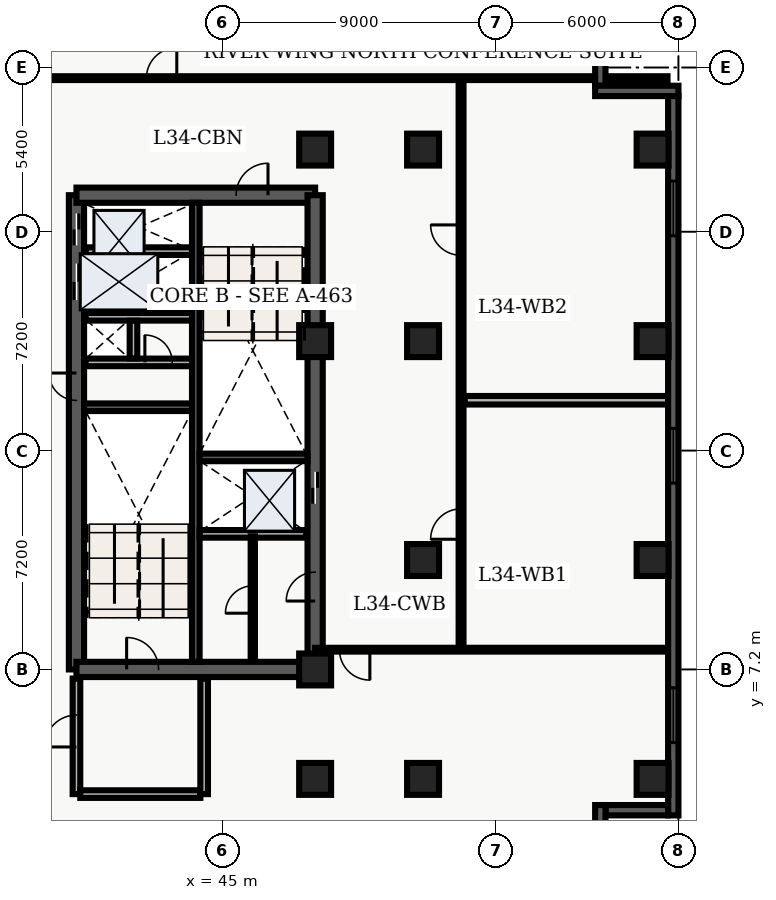
"""IFC4 building model, lengths in metres.
Left out: names, types, materials, properties, quantities, classifications, styles, units other than length and angle.
Written with IfcOpenShell. Run it as: python <this file> out.ifc"""

import sys

from ifc_helpers import new_model, entity, si_unit, converted_unit, direction, frame, origin_with_axes, origin_2d_with_axis, place, context, subcontext, project, spatial, polyline, rectangle, outline, extrude, element, fill, save


model = new_model("IFC4")
c1 = context("Model", 3, precision=1e-05, world=origin_with_axes(), true_north=direction((0.0, 1.0)))
c2 = subcontext(c1, "Body", "Model", "MODEL_VIEW")
j1 = project(units=[si_unit("LENGTHUNIT", "METRE"), converted_unit("PLANEANGLEUNIT", "DEGREE", entity("IfcPlaneAngleMeasure", 0.017), si_unit("PLANEANGLEUNIT", "RADIAN"), dimensions=[0, 0, 0, 0, 0, 0, 0])], contexts=[c1])
p1 = place(None, origin_with_axes())
s1 = spatial("IfcSite", under=j1, at=p1, CompositionType="ELEMENT")
p2 = place(p1, origin_with_axes())
s2 = spatial("IfcBuilding", under=s1, at=p2, CompositionType="ELEMENT")
p3 = place(p2, frame((0.0, 0.0, 140.7), z_axis=(0.0, 0.0, 1.0), x_axis=(1.0, 0.0, 0.0)))
s3 = spatial("IfcBuildingStorey", under=s2, at=p3, CompositionType="ELEMENT", Elevation=140.7)
p4 = place(p3, frame((40.2, 7.2, 0.0), z_axis=(0.0, 0.0, 1.0), x_axis=(0.0, 1.0, 0.0)))
e1 = element("IfcWall", 1, at=p4, inside=s3, PredefinedType="SHEAR", context=c2, shape_type="SweptSolid", body=[
    extrude(outline(polyline([(0.0, -0.25), (15.6, -0.25), (15.6, 0.25), (0.0, 0.25), (0.0, -0.25)])), origin_with_axes(), (0.0, 0.0, 1.0), 3.66),
])
p5 = place(p4, frame((14.475, 0.0, 0.0), z_axis=(0.0, 0.0, 1.0), x_axis=(1.0, 0.0, 0.0)))
e2 = element("IfcOpeningElement", 2, at=p5, cuts=e1, PredefinedType="OPENING", context=c2, shape_type="SweptSolid", body=[
    extrude(rectangle(XDim=1.05, YDim=0.52, at=origin_2d_with_axis()), origin_with_axes(), (0.0, 0.0, 1.0), 2.15),
])
p6 = place(p4, frame((12.75, 0.0, 0.0), z_axis=(0.0, 0.0, 1.0), x_axis=(1.0, 0.0, 0.0)))
e3 = element("IfcOpeningElement", 3, at=p6, cuts=e1, PredefinedType="OPENING", context=c2, shape_type="SweptSolid", body=[
    extrude(rectangle(XDim=1.2, YDim=0.52, at=origin_2d_with_axis()), origin_with_axes(), (0.0, 0.0, 1.0), 2.15),
])
p7 = place(p4, frame((9.3, 0.0, 0.0), z_axis=(0.0, 0.0, 1.0), x_axis=(1.0, 0.0, 0.0)))
e4 = element("IfcOpeningElement", 4, at=p7, cuts=e1, PredefinedType="OPENING", context=c2, shape_type="SweptSolid", body=[
    extrude(rectangle(XDim=0.9, YDim=0.52, at=origin_2d_with_axis()), origin_with_axes(), (0.0, 0.0, 1.0), 2.15),
])
p8 = place(p3, frame((40.2, 7.2, 0.0), z_axis=(0.0, 0.0, 1.0), x_axis=(1.0, 0.0, 0.0)))
e5 = element("IfcWall", 5, at=p8, inside=s3, PredefinedType="SHEAR", context=c2, shape_type="SweptSolid", body=[
    extrude(outline(polyline([(0.0, -0.25), (7.85, -0.25), (7.85, 0.25), (0.0, 0.25), (0.0, -0.25)])), origin_with_axes(), (0.0, 0.0, 1.0), 3.66),
])
p9 = place(p8, frame((2.175, 0.0, 0.0), z_axis=(0.0, 0.0, 1.0), x_axis=(1.0, 0.0, 0.0)))
e6 = element("IfcOpeningElement", 6, at=p9, cuts=e5, PredefinedType="OPENING", context=c2, shape_type="SweptSolid", body=[
    extrude(rectangle(XDim=1.05, YDim=0.52, at=origin_2d_with_axis()), origin_with_axes(), (0.0, 0.0, 1.0), 2.15),
])
p10 = place(p3, frame((40.2, 22.8, 0.0), z_axis=(0.0, 0.0, 1.0), x_axis=(1.0, 0.0, 0.0)))
e7 = element("IfcWall", 7, at=p10, inside=s3, PredefinedType="SHEAR", context=c2, shape_type="SweptSolid", body=[
    extrude(outline(polyline([(0.0, -0.25), (7.85, -0.25), (7.85, 0.25), (0.0, 0.25), (0.0, -0.25)])), origin_with_axes(), (0.0, 0.0, 1.0), 3.66),
])
p11 = place(p10, frame((5.775, 0.0, 0.0), z_axis=(0.0, 0.0, 1.0), x_axis=(1.0, 0.0, 0.0)))
e8 = element("IfcOpeningElement", 8, at=p11, cuts=e7, PredefinedType="OPENING", context=c2, shape_type="SweptSolid", body=[
    extrude(rectangle(XDim=1.05, YDim=0.52, at=origin_2d_with_axis()), origin_with_axes(), (0.0, 0.0, 1.0), 2.15),
])
p12 = place(p3, frame((48.05, 7.2, 0.0), z_axis=(0.0, 0.0, 1.0), x_axis=(0.0, 1.0, 0.0)))
e9 = element("IfcWall", 9, at=p12, inside=s3, PredefinedType="SHEAR", context=c2, shape_type="SweptSolid", body=[
    extrude(outline(polyline([(0.0, -0.25), (15.6, -0.25), (15.6, 0.25), (0.0, 0.25), (0.0, -0.25)])), origin_with_axes(), (0.0, 0.0, 1.0), 3.66),
])
p13 = place(p12, frame((5.975, 0.0, 0.0), z_axis=(0.0, 0.0, 1.0), x_axis=(1.0, 0.0, 0.0)))
e10 = element("IfcOpeningElement", 10, at=p13, cuts=e9, PredefinedType="OPENING", context=c2, shape_type="SweptSolid", body=[
    extrude(rectangle(XDim=1.05, YDim=0.52, at=origin_2d_with_axis()), origin_with_axes(), (0.0, 0.0, 1.0), 2.15),
])
p14 = place(p12, frame((2.725, 0.0, 0.0), z_axis=(0.0, 0.0, 1.0), x_axis=(1.0, 0.0, 0.0)))
e11 = element("IfcOpeningElement", 11, at=p14, cuts=e9, PredefinedType="OPENING", context=c2, shape_type="SweptSolid", body=[
    extrude(rectangle(XDim=0.95, YDim=0.52, at=origin_2d_with_axis()), origin_with_axes(), (0.0, 0.0, 1.0), 2.15),
])
p15 = place(p3, frame((44.125, 7.45, 0.0), z_axis=(0.0, 0.0, 1.0), x_axis=(0.0, 1.0, 0.0)))
e12 = element("IfcWall", 12, at=p15, inside=s3, PredefinedType="SHEAR", context=c2, shape_type="SweptSolid", body=[
    extrude(outline(polyline([(0.0, -0.125), (15.1, -0.125), (15.1, 0.125), (0.0, 0.125), (0.0, -0.125)])), origin_with_axes(), (0.0, 0.0, 1.0), 3.66),
])
for number, where, z_axis, x_axis in (
    (13, (40.45, 15.825, 0.0), (0.0, 0.0, 1.0), (1.0, 0.0, 0.0)),
    (14, (44.25, 14.175, 0.0), (0.0, 0.0, 1.0), (1.0, 0.0, 0.0)),
):
    element("IfcWall", number, at=place(p3, frame(where, z_axis=z_axis, x_axis=x_axis)), inside=s3, PredefinedType="SHEAR", context=c2, shape_type="SweptSolid", body=[
        extrude(outline(polyline([(0.0, -0.125), (3.55, -0.125), (3.55, 0.125), (0.0, 0.125), (0.0, -0.125)])), origin_with_axes(), (0.0, 0.0, 1.0), 3.66),
    ])
p16 = place(p3, frame((40.5, 17.3, 0.0), z_axis=(0.0, 0.0, 1.0), x_axis=(1.0, 0.0, 0.0)))
e15 = element("IfcWall", 15, at=p16, inside=s3, PredefinedType="SOLIDWALL", context=c2, shape_type="SweptSolid", body=[
    extrude(outline(polyline([(0.0, -0.125), (3.5, -0.125), (3.5, 0.125), (0.0, 0.125), (0.0, -0.125)])), origin_with_axes(), (0.0, 0.0, 1.0), 2.7),
])
p17 = place(p16, frame((2.4, 0.0, 0.0), z_axis=(0.0, 0.0, 1.0), x_axis=(1.0, 0.0, 0.0)))
e16 = element("IfcOpeningElement", 16, at=p17, cuts=e15, PredefinedType="OPENING", context=c2, shape_type="SweptSolid", body=[
    extrude(rectangle(XDim=0.9, YDim=0.27, at=origin_2d_with_axis()), origin_with_axes(), (0.0, 0.0, 1.0), 2.15),
])
p18 = place(p3, frame((40.5, 18.8, 0.0), z_axis=(0.0, 0.0, 1.0), x_axis=(1.0, 0.0, 0.0)))
e17 = element("IfcWall", 17, at=p18, inside=s3, PredefinedType="SOLIDWALL", context=c2, shape_type="SweptSolid", body=[
    extrude(outline(polyline([(0.0, -0.125), (3.5, -0.125), (3.5, 0.125), (0.0, 0.125), (0.0, -0.125)])), origin_with_axes(), (0.0, 0.0, 1.0), 2.7),
])
p19 = place(p3, frame((42.075, 17.43, 0.0), z_axis=(0.0, 0.0, 1.0), x_axis=(0.0, 1.0, 0.0)))
e18 = element("IfcWall", 18, at=p19, inside=s3, PredefinedType="SOLIDWALL", context=c2, shape_type="SweptSolid", body=[
    extrude(outline(polyline([(0.0, -0.125), (1.24, -0.125), (1.24, 0.125), (0.0, 0.125), (0.0, -0.125)])), origin_with_axes(), (0.0, 0.0, 1.0), 2.7),
])
p20 = place(p3, frame((40.2, 3.1, 0.0), z_axis=(0.0, 0.0, 1.0), x_axis=(0.0, 1.0, 0.0)))
e19 = element("IfcWall", 19, at=p20, inside=s3, PredefinedType="SOLIDWALL", context=c2, shape_type="SweptSolid", body=[
    extrude(outline(polyline([(0.0, -0.125), (3.8, -0.125), (3.8, 0.125), (0.0, 0.125), (0.0, -0.125)])), origin_with_axes(), (0.0, 0.0, 1.0), 2.7),
])
p21 = place(p20, frame((2.075, 0.0, 0.0), z_axis=(0.0, 0.0, 1.0), x_axis=(1.0, 0.0, 0.0)))
e20 = element("IfcOpeningElement", 20, at=p21, cuts=e19, PredefinedType="OPENING", context=c2, shape_type="SweptSolid", body=[
    extrude(rectangle(XDim=1.05, YDim=0.27, at=origin_2d_with_axis()), origin_with_axes(), (0.0, 0.0, 1.0), 2.15),
])
p22 = place(p3, frame((40.325, 3.1, 0.0), z_axis=(0.0, 0.0, 1.0), x_axis=(1.0, 0.0, 0.0)))
e21 = element("IfcWall", 21, at=p22, inside=s3, PredefinedType="SOLIDWALL", context=c2, shape_type="SweptSolid", body=[
    extrude(outline(polyline([(0.0, -0.125), (3.95, -0.125), (3.95, 0.125), (0.0, 0.125), (0.0, -0.125)])), origin_with_axes(), (0.0, 0.0, 1.0), 2.7),
])
p23 = place(p3, frame((44.4, 3.1, 0.0), z_axis=(0.0, 0.0, 1.0), x_axis=(0.0, 1.0, 0.0)))
e22 = element("IfcWall", 22, at=p23, inside=s3, PredefinedType="SOLIDWALL", context=c2, shape_type="SweptSolid", body=[
    extrude(outline(polyline([(0.0, -0.125), (3.8, -0.125), (3.8, 0.125), (0.0, 0.125), (0.0, -0.125)])), origin_with_axes(), (0.0, 0.0, 1.0), 2.7),
])
for number, where, z_axis, x_axis in (
    (23, (48.05, 3.6, 0.0), (0.0, 0.0, 1.0), (1.0, 0.0, 0.0)),
    (24, (48.05, 7.2, 0.0), (0.0, 0.0, 1.0), (1.0, 0.0, 0.0)),
    (25, (48.05, 18.0, 0.0), (0.0, 0.0, 1.0), (1.0, 0.0, 0.0)),
    (26, (48.05, 24.3, 0.0), (0.0, 0.0, 1.0), (1.0, 0.0, 0.0)),
    (27, (51.6, 3.6, 0.0), (0.0, 0.0, 1.0), (1.0, 0.0, 0.0)),
    (28, (51.6, 10.8, 0.0), (0.0, 0.0, 1.0), (1.0, 0.0, 0.0)),
    (29, (51.6, 18.0, 0.0), (0.0, 0.0, 1.0), (1.0, 0.0, 0.0)),
    (30, (51.6, 24.3, 0.0), (0.0, 0.0, 1.0), (1.0, 0.0, 0.0)),
    (31, (59.15, 3.6, 0.0), (0.0, 0.0, 1.0), (1.0, 0.0, 0.0)),
    (32, (59.15, 10.8, 0.0), (0.0, 0.0, 1.0), (1.0, 0.0, 0.0)),
    (33, (59.15, 18.0, 0.0), (0.0, 0.0, 1.0), (1.0, 0.0, 0.0)),
    (34, (59.15, 24.3, 0.0), (0.0, 0.0, 1.0), (1.0, 0.0, 0.0)),
):
    element("IfcColumn", number, at=place(p3, frame(where, z_axis=z_axis, x_axis=x_axis)), inside=s3, PredefinedType="COLUMN", context=c2, shape_type="SweptSolid", body=[
        extrude(rectangle(XDim=1.05, YDim=1.05, at=origin_2d_with_axis()), origin_with_axes(), (0.0, 0.0, 1.0), 3.9),
    ])
for number, where, z_axis, x_axis in (
    (35, (40.5, 20.96, 0.0), (0.0, 0.0, 1.0), (1.0, 0.0, 0.0)),
    (36, (44.25, 11.66, 0.0), (0.0, 0.0, 1.0), (1.0, 0.0, 0.0)),
):
    element("IfcWall", number, at=place(p3, frame(where, z_axis=z_axis, x_axis=x_axis)), inside=s3, PredefinedType="SOLIDWALL", context=c2, shape_type="SweptSolid", body=[
        extrude(outline(polyline([(0.0, -0.125), (3.5, -0.125), (3.5, 0.125), (0.0, 0.125), (0.0, -0.125)])), origin_with_axes(), (0.0, 0.0, 1.0), 2.7),
    ])
p24 = place(p3, frame((46.0, 7.5, 0.0), z_axis=(0.0, 0.0, 1.0), x_axis=(0.0, 1.0, 0.0)))
e37 = element("IfcWall", 37, at=p24, inside=s3, PredefinedType="PARTITIONING", context=c2, shape_type="SweptSolid", body=[
    extrude(outline(polyline([(0.0, -0.07), (4.08, -0.07), (4.08, 0.07), (0.0, 0.07), (0.0, -0.07)])), origin_with_axes(), (0.0, 0.0, 1.0), 2.7),
])
p25 = place(p24, frame((2.0, 0.0, 0.0), z_axis=(0.0, 0.0, 1.0), x_axis=(1.0, 0.0, 0.0)))
e38 = element("IfcOpeningElement", 38, at=p25, cuts=e37, PredefinedType="OPENING", context=c2, shape_type="SweptSolid", body=[
    extrude(rectangle(XDim=0.9, YDim=0.16, at=origin_2d_with_axis()), origin_with_axes(), (0.0, 0.0, 1.0), 2.15),
])
p26 = place(p3, frame((52.85, 7.85, 0.0), z_axis=(0.0, 0.0, 1.0), x_axis=(0.0, 1.0, 0.0)))
e39 = element("IfcWall", 39, at=p26, inside=s3, PredefinedType="PARTITIONING", context=c2, shape_type="SweptSolid", body=[
    extrude(outline(polyline([(0.0, -0.08), (18.8, -0.08), (18.8, 0.08), (0.0, 0.08), (0.0, -0.08)])), origin_with_axes(), (0.0, 0.0, 1.0), 2.7),
])
p27 = place(p26, frame((4.133, 0.0, 0.0), z_axis=(0.0, 0.0, 1.0), x_axis=(1.0, 0.0, 0.0)))
e40 = element("IfcOpeningElement", 40, at=p27, cuts=e39, PredefinedType="OPENING", context=c2, shape_type="SweptSolid", body=[
    extrude(rectangle(XDim=1.0, YDim=0.18, at=origin_2d_with_axis()), origin_with_axes(), (0.0, 0.0, 1.0), 2.15),
])
p28 = place(p26, frame((13.473, 0.0, 0.0), z_axis=(0.0, 0.0, 1.0), x_axis=(1.0, 0.0, 0.0)))
e41 = element("IfcOpeningElement", 41, at=p28, cuts=e39, PredefinedType="OPENING", context=c2, shape_type="SweptSolid", body=[
    extrude(rectangle(XDim=1.0, YDim=0.18, at=origin_2d_with_axis()), origin_with_axes(), (0.0, 0.0, 1.0), 2.15),
])
p29 = place(p3, frame((59.665, 7.85, 0.0), z_axis=(0.0, 0.0, 1.0), x_axis=(-1.0, 0.0, 0.0)))
e42 = element("IfcWall", 42, at=p29, inside=s3, PredefinedType="PARTITIONING", context=c2, shape_type="SweptSolid", body=[
    extrude(outline(polyline([(0.0, -0.062), (11.615, -0.062), (11.615, 0.062), (0.0, 0.062), (0.0, -0.062)])), origin_with_axes(), (0.0, 0.0, 1.0), 2.7),
])
p30 = place(p29, frame((10.315, 0.0, 0.0), z_axis=(0.0, 0.0, 1.0), x_axis=(1.0, 0.0, 0.0)))
e43 = element("IfcOpeningElement", 43, at=p30, cuts=e42, PredefinedType="OPENING", context=c2, shape_type="SweptSolid", body=[
    extrude(rectangle(XDim=1.0, YDim=0.145, at=origin_2d_with_axis()), origin_with_axes(), (0.0, 0.0, 1.0), 2.15),
])
p31 = place(p3, frame((38.735, 26.65, 0.0), z_axis=(0.0, 0.0, 1.0), x_axis=(1.0, 0.0, 0.0)))
e44 = element("IfcWall", 44, at=p31, inside=s3, PredefinedType="PARTITIONING", context=c2, shape_type="SweptSolid", body=[
    extrude(outline(polyline([(0.0, -0.062), (20.905, -0.062), (20.905, 0.062), (0.0, 0.062), (0.0, -0.062)])), origin_with_axes(), (0.0, 0.0, 1.0), 2.7),
])
p32 = place(p31, frame((4.265, 0.0, 0.0), z_axis=(0.0, 0.0, 1.0), x_axis=(1.0, 0.0, 0.0)))
e45 = element("IfcOpeningElement", 45, at=p32, cuts=e44, PredefinedType="OPENING", context=c2, shape_type="SweptSolid", body=[
    extrude(rectangle(XDim=1.0, YDim=0.145, at=origin_2d_with_axis()), origin_with_axes(), (0.0, 0.0, 1.0), 2.15),
])
p33 = place(p3, frame((52.97, 16.055, 0.0), z_axis=(0.0, 0.0, 1.0), x_axis=(1.0, 0.0, 0.0)))
e46 = element("IfcWall", 46, at=p33, inside=s3, PredefinedType="PARTITIONING", context=c2, shape_type="SweptSolid", body=[
    extrude(outline(polyline([(0.0, -0.14), (6.695, -0.14), (6.695, 0.14), (0.0, 0.14), (0.0, -0.14)])), origin_with_axes(), (0.0, 0.0, 1.0), 2.7),
])
p34 = place(p3, frame((57.43, 28.46, 0.0), z_axis=(0.0, 0.0, 1.0), x_axis=(0.0, -1.0, 0.0)))
e47 = element("IfcWall", 47, at=p34, inside=s3, PredefinedType="SOLIDWALL", context=c2, shape_type="SweptSolid", body=[
    extrude(outline(polyline([(0.0, -0.17), (2.06, -0.17), (2.06, 0.17), (0.0, 0.17), (0.0, -0.17)])), origin_with_axes(), (0.0, 0.0, 1.0), 3.66),
])
p35 = place(p3, frame((57.26, 26.23, 0.0), z_axis=(0.0, 0.0, 1.0), x_axis=(1.0, 0.0, 0.0)))
e48 = element("IfcWall", 48, at=p35, inside=s3, PredefinedType="SOLIDWALL", context=c2, shape_type="SweptSolid", body=[
    extrude(outline(polyline([(0.0, -0.17), (2.74, -0.17), (2.74, 0.17), (0.0, 0.17), (0.0, -0.17)])), origin_with_axes(), (0.0, 0.0, 1.0), 3.66),
])
p36 = place(p3, frame((59.83, 26.06, 0.0), z_axis=(0.0, 0.0, 1.0), x_axis=(0.0, -1.0, 0.0)))
e49 = element("IfcWall", 49, at=p36, inside=s3, PredefinedType="SOLIDWALL", context=c2, shape_type="SweptSolid", body=[
    extrude(outline(polyline([(0.0, -0.17), (23.66, -0.17), (23.66, 0.17), (0.0, 0.17), (0.0, -0.17)])), origin_with_axes(), (0.0, 0.0, 1.0), 3.66),
])
p37 = place(p36, frame((3.696, 0.0, 0.45), z_axis=(0.0, 0.0, 1.0), x_axis=(1.0, 0.0, 0.0)))
e50 = element("IfcOpeningElement", 50, at=p37, cuts=e49, PredefinedType="OPENING", context=c2, shape_type="SweptSolid", body=[
    extrude(rectangle(XDim=1.8, YDim=0.36, at=origin_2d_with_axis()), origin_with_axes(), (0.0, 0.0, 1.0), 2.1),
])
p38 = place(p36, frame((11.83, 0.0, 0.45), z_axis=(0.0, 0.0, 1.0), x_axis=(1.0, 0.0, 0.0)))
e51 = element("IfcOpeningElement", 51, at=p38, cuts=e49, PredefinedType="OPENING", context=c2, shape_type="SweptSolid", body=[
    extrude(rectangle(XDim=1.8, YDim=0.36, at=origin_2d_with_axis()), origin_with_axes(), (0.0, 0.0, 1.0), 2.1),
])
p39 = place(p36, frame((20.364, 0.0, 0.45), z_axis=(0.0, 0.0, 1.0), x_axis=(1.0, 0.0, 0.0)))
e52 = element("IfcOpeningElement", 52, at=p39, cuts=e49, PredefinedType="OPENING", context=c2, shape_type="SweptSolid", body=[
    extrude(rectangle(XDim=1.8, YDim=0.36, at=origin_2d_with_axis()), origin_with_axes(), (0.0, 0.0, 1.0), 2.1),
])
p40 = place(p3, frame((59.66, 2.57, 0.0), z_axis=(0.0, 0.0, 1.0), x_axis=(-1.0, 0.0, 0.0)))
e53 = element("IfcWall", 53, at=p40, inside=s3, PredefinedType="SOLIDWALL", context=c2, shape_type="SweptSolid", body=[
    extrude(outline(polyline([(0.0, -0.17), (2.06, -0.17), (2.06, 0.17), (0.0, 0.17), (0.0, -0.17)])), origin_with_axes(), (0.0, 0.0, 1.0), 3.66),
])
p41 = place(p3, frame((57.43, 2.74, 0.0), z_axis=(0.0, 0.0, 1.0), x_axis=(0.0, -1.0, 0.0)))
e54 = element("IfcWall", 54, at=p41, inside=s3, PredefinedType="SOLIDWALL", context=c2, shape_type="SweptSolid", body=[
    extrude(outline(polyline([(0.0, -0.17), (2.74, -0.17), (2.74, 0.17), (0.0, 0.17), (0.0, -0.17)])), origin_with_axes(), (0.0, 0.0, 1.0), 3.66),
])
p42 = place(p12, frame((5.975, 0.0, 0.0), z_axis=(0.0, 0.0, 1.0), x_axis=(1.0, 0.0, 0.0)))
e55 = element("IfcDoor", 55, at=p42, inside=s3, OperationType="SLIDING_TO_LEFT", PredefinedType="DOOR", context=c2, shape_type="SweptSolid", body=[
    extrude(rectangle(XDim=1.05, YDim=0.09, at=origin_2d_with_axis()), origin_with_axes(), (0.0, 0.0, 1.0), 2.15),
])
fill(e10, e55)
p43 = place(p4, frame((14.475, 0.0, 0.0), z_axis=(0.0, 0.0, 1.0), x_axis=(1.0, 0.0, 0.0)))
e56 = element("IfcDoor", 56, at=p43, inside=s3, OperationType="SLIDING_TO_RIGHT", PredefinedType="DOOR", context=c2, shape_type="SweptSolid", body=[
    extrude(rectangle(XDim=1.05, YDim=0.09, at=origin_2d_with_axis()), origin_with_axes(), (0.0, 0.0, 1.0), 2.15),
])
fill(e2, e56)
p44 = place(p4, frame((12.75, 0.0, 0.0), z_axis=(0.0, 0.0, 1.0), x_axis=(1.0, 0.0, 0.0)))
e57 = element("IfcDoor", 57, at=p44, inside=s3, OperationType="DOUBLE_DOOR_SLIDING", PredefinedType="DOOR", context=c2, shape_type="SweptSolid", body=[
    extrude(rectangle(XDim=1.2, YDim=0.09, at=origin_2d_with_axis()), origin_with_axes(), (0.0, 0.0, 1.0), 2.15),
])
fill(e3, e57)
p45 = place(p4, frame((9.3, 0.0, 0.0), z_axis=(0.0, 0.0, 1.0), x_axis=(1.0, 0.0, 0.0)))
e58 = element("IfcDoor", 58, at=p45, inside=s3, OperationType="SINGLE_SWING_RIGHT", PredefinedType="DOOR", context=c2, shape_type="SweptSolid", body=[
    extrude(rectangle(XDim=0.9, YDim=0.09, at=origin_2d_with_axis()), origin_with_axes(), (0.0, 0.0, 1.0), 2.15),
])
fill(e4, e58)
p46 = place(p16, frame((2.4, 0.0, 0.0), z_axis=(0.0, 0.0, 1.0), x_axis=(1.0, 0.0, 0.0)))
e59 = element("IfcDoor", 59, at=p46, inside=s3, OperationType="SINGLE_SWING_LEFT", PredefinedType="DOOR", context=c2, shape_type="SweptSolid", body=[
    extrude(rectangle(XDim=0.9, YDim=0.09, at=origin_2d_with_axis()), origin_with_axes(), (0.0, 0.0, 1.0), 2.15),
])
fill(e16, e59)
p47 = place(p8, frame((2.175, 0.0, 0.0), z_axis=(0.0, 0.0, 1.0), x_axis=(1.0, 0.0, 0.0)))
e60 = element("IfcDoor", 60, at=p47, inside=s3, OperationType="SINGLE_SWING_LEFT", PredefinedType="DOOR", context=c2, shape_type="SweptSolid", body=[
    extrude(rectangle(XDim=1.05, YDim=0.09, at=origin_2d_with_axis()), origin_with_axes(), (0.0, 0.0, 1.0), 2.15),
])
fill(e6, e60)
p48 = place(p10, frame((5.775, 0.0, 0.0), z_axis=(0.0, 0.0, 1.0), x_axis=(1.0, 0.0, 0.0)))
e61 = element("IfcDoor", 61, at=p48, inside=s3, OperationType="SINGLE_SWING_RIGHT", PredefinedType="DOOR", context=c2, shape_type="SweptSolid", body=[
    extrude(rectangle(XDim=1.05, YDim=0.09, at=origin_2d_with_axis()), origin_with_axes(), (0.0, 0.0, 1.0), 2.15),
])
fill(e8, e61)
p49 = place(p20, frame((2.075, 0.0, 0.0), z_axis=(0.0, 0.0, 1.0), x_axis=(1.0, 0.0, 0.0)))
e62 = element("IfcDoor", 62, at=p49, inside=s3, OperationType="SINGLE_SWING_LEFT", PredefinedType="DOOR", context=c2, shape_type="SweptSolid", body=[
    extrude(rectangle(XDim=1.05, YDim=0.09, at=origin_2d_with_axis()), origin_with_axes(), (0.0, 0.0, 1.0), 2.15),
])
fill(e20, e62)
p50 = place(p24, frame((2.0, 0.0, 0.0), z_axis=(0.0, 0.0, 1.0), x_axis=(1.0, 0.0, 0.0)))
e63 = element("IfcDoor", 63, at=p50, inside=s3, OperationType="SINGLE_SWING_LEFT", PredefinedType="DOOR", context=c2, shape_type="SweptSolid", body=[
    extrude(rectangle(XDim=0.9, YDim=0.084, at=origin_2d_with_axis()), origin_with_axes(), (0.0, 0.0, 1.0), 2.15),
])
fill(e38, e63)
p51 = place(p12, frame((2.725, 0.0, 0.0), z_axis=(0.0, 0.0, 1.0), x_axis=(1.0, 0.0, 0.0)))
e64 = element("IfcDoor", 64, at=p51, inside=s3, OperationType="SINGLE_SWING_LEFT", PredefinedType="DOOR", context=c2, shape_type="SweptSolid", body=[
    extrude(rectangle(XDim=0.95, YDim=0.09, at=origin_2d_with_axis()), origin_with_axes(), (0.0, 0.0, 1.0), 2.15),
])
fill(e11, e64)
p52 = place(p29, frame((10.315, 0.0, 0.0), z_axis=(0.0, 0.0, 1.0), x_axis=(1.0, 0.0, 0.0)))
e65 = element("IfcDoor", 65, at=p52, inside=s3, OperationType="SINGLE_SWING_LEFT", PredefinedType="DOOR", context=c2, shape_type="SweptSolid", body=[
    extrude(rectangle(XDim=1.0, YDim=0.075, at=origin_2d_with_axis()), origin_with_axes(), (0.0, 0.0, 1.0), 2.15),
])
fill(e43, e65)
p53 = place(p31, frame((4.265, 0.0, 0.0), z_axis=(0.0, 0.0, 1.0), x_axis=(1.0, 0.0, 0.0)))
e66 = element("IfcDoor", 66, at=p53, inside=s3, OperationType="SINGLE_SWING_RIGHT", PredefinedType="DOOR", context=c2, shape_type="SweptSolid", body=[
    extrude(rectangle(XDim=1.0, YDim=0.075, at=origin_2d_with_axis()), origin_with_axes(), (0.0, 0.0, 1.0), 2.15),
])
fill(e45, e66)
p54 = place(p26, frame((4.133, 0.0, 0.0), z_axis=(0.0, 0.0, 1.0), x_axis=(1.0, 0.0, 0.0)))
e67 = element("IfcDoor", 67, at=p54, inside=s3, OperationType="SINGLE_SWING_LEFT", PredefinedType="DOOR", context=c2, shape_type="SweptSolid", body=[
    extrude(rectangle(XDim=1.0, YDim=0.09, at=origin_2d_with_axis()), origin_with_axes(), (0.0, 0.0, 1.0), 2.15),
])
fill(e40, e67)
p55 = place(p26, frame((13.473, 0.0, 0.0), z_axis=(0.0, 0.0, 1.0), x_axis=(1.0, 0.0, 0.0)))
e68 = element("IfcDoor", 68, at=p55, inside=s3, OperationType="SINGLE_SWING_RIGHT", PredefinedType="DOOR", context=c2, shape_type="SweptSolid", body=[
    extrude(rectangle(XDim=1.0, YDim=0.09, at=origin_2d_with_axis()), origin_with_axes(), (0.0, 0.0, 1.0), 2.15),
])
fill(e41, e68)
p56 = place(p36, frame((3.696, 0.0, 0.45), z_axis=(0.0, 0.0, 1.0), x_axis=(1.0, 0.0, 0.0)))
e69 = element("IfcWindow", 69, at=p56, inside=s3, PredefinedType="WINDOW", context=c2, shape_type="SweptSolid", body=[
    extrude(rectangle(XDim=1.8, YDim=0.09, at=origin_2d_with_axis()), origin_with_axes(), (0.0, 0.0, 1.0), 2.1),
])
fill(e50, e69)
p57 = place(p36, frame((11.83, 0.0, 0.45), z_axis=(0.0, 0.0, 1.0), x_axis=(1.0, 0.0, 0.0)))
e70 = element("IfcWindow", 70, at=p57, inside=s3, PredefinedType="WINDOW", context=c2, shape_type="SweptSolid", body=[
    extrude(rectangle(XDim=1.8, YDim=0.09, at=origin_2d_with_axis()), origin_with_axes(), (0.0, 0.0, 1.0), 2.1),
])
fill(e51, e70)
p58 = place(p36, frame((20.364, 0.0, 0.45), z_axis=(0.0, 0.0, 1.0), x_axis=(1.0, 0.0, 0.0)))
e71 = element("IfcWindow", 71, at=p58, inside=s3, PredefinedType="WINDOW", context=c2, shape_type="SweptSolid", body=[
    extrude(rectangle(XDim=1.8, YDim=0.09, at=origin_2d_with_axis()), origin_with_axes(), (0.0, 0.0, 1.0), 2.1),
])
fill(e52, e71)
save(model, sys.argv[1])
